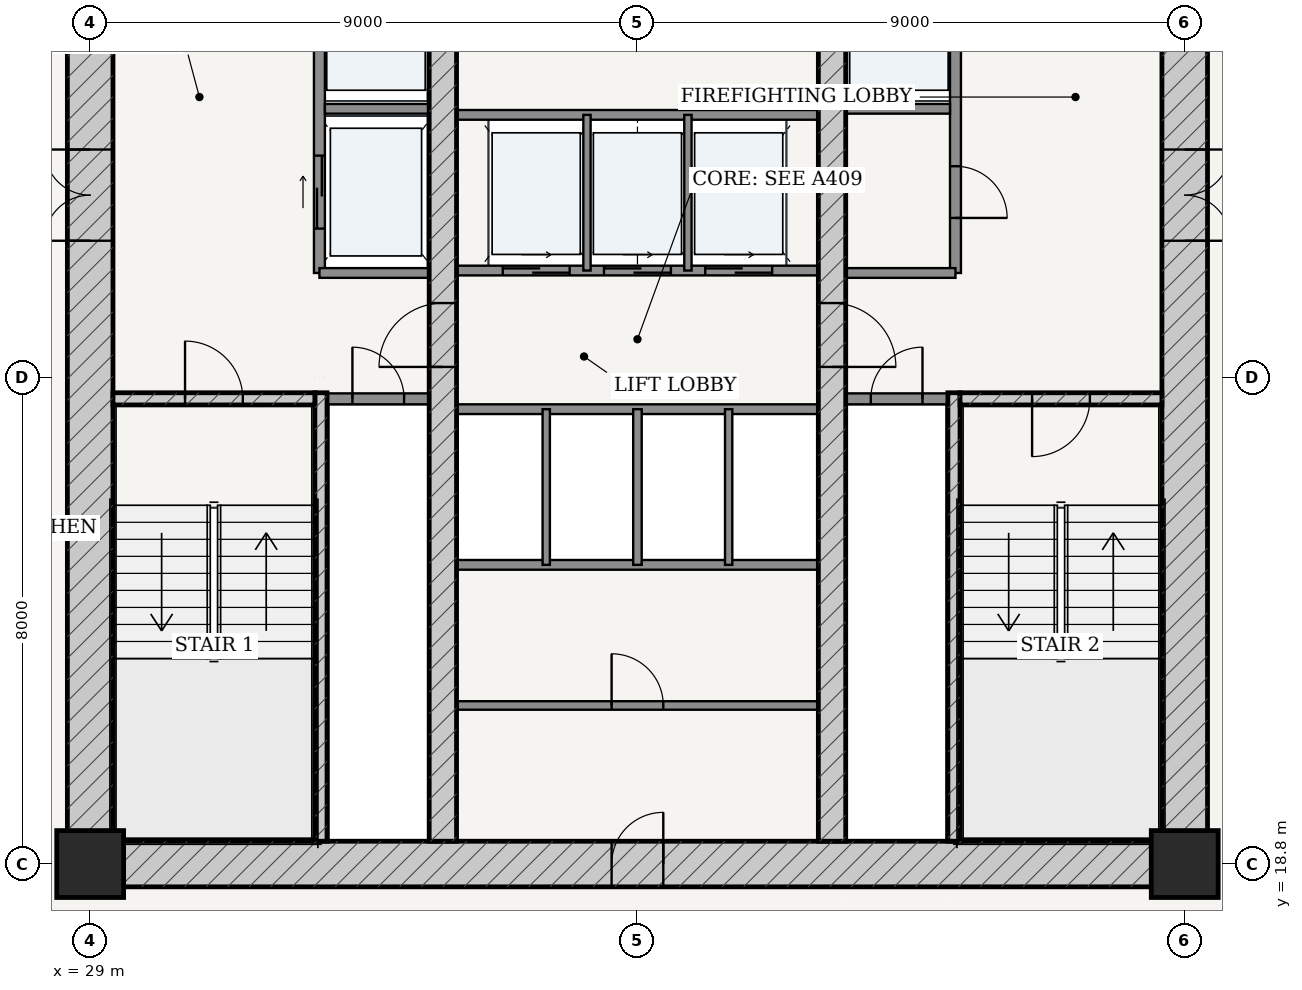
"""IFC4 building model, lengths in metres.
Left out: names, types, materials, properties, quantities, classifications, styles, units other than length and angle.
Written with IfcOpenShell. Run it as: python <this file> out.ifc"""

import sys

from ifc_helpers import new_model, si_unit, direction, frame, frame_2d, origin, origin_2d, place, context, subcontext, project, spatial, rectangle, extrude, source, transform, mapped, element, fill, save


model = new_model("IFC4")
c1 = context("Model", 3, precision=1e-05, world=origin(), true_north=direction((-0.2419218956, 0.970295726276)))
c2 = subcontext(c1, "Body", "Model", "MODEL_VIEW")
j1 = project(units=[si_unit("LENGTHUNIT", "METRE"), si_unit("PLANEANGLEUNIT", "RADIAN")], contexts=[c1])
p1 = place(None, origin())
s1 = spatial("IfcSite", under=j1, at=p1, CompositionType="ELEMENT")
p2 = place(p1, origin())
s2 = spatial("IfcBuilding", under=s1, at=p2, CompositionType="ELEMENT")
p3 = place(p2, frame((0.0, 0.0, 27.6)))
s3 = spatial("IfcBuildingStorey", under=s2, at=p3, CompositionType="ELEMENT", Elevation=27.6)
for number, where, z_axis, x_axis in (
    (1, (29.0, 18.8, 0.0), (0.0, 0.0, 1.0), (1.0, 0.0, 0.0)),
    (2, (47.0, 18.8, 0.0), (0.0, 0.0, 1.0), (1.0, 0.0, 0.0)),
):
    element("IfcColumn", number, at=place(p3, frame(where, z_axis=z_axis, x_axis=x_axis)), inside=s3, PredefinedType="COLUMN", context=c2, shape_type="SweptSolid", body=[
        extrude(rectangle(XDim=1.1, YDim=1.1, at=origin_2d()), origin(), (0.0, 0.0, 1.0), 3.6),
    ])
p4 = place(p3, frame((28.625, 18.8, 0.0), z_axis=(0.0, 0.0, 1.0), x_axis=(1.0, 0.0, 0.0)))
e3 = element("IfcWall", 3, at=p4, inside=s3, PredefinedType="SHEAR", context=c2, shape_type="SweptSolid", body=[
    extrude(rectangle(XDim=18.75, YDim=0.75, at=frame_2d((9.375, 0.0))), origin(), (0.0, 0.0, 1.0), 3.32),
])
p5 = place(p4, frame((8.95, 0.0, 0.0)))
e4 = element("IfcOpeningElement", 4, at=p5, cuts=e3, PredefinedType="OPENING", context=c2, shape_type="SweptSolid", body=[
    extrude(rectangle(XDim=0.85, YDim=2.1, at=frame_2d((0.425, 1.05))), frame((0.0, 0.385, 0.0), z_axis=(0.0, -1.0, 0.0), x_axis=(1.0, 0.0, 0.0)), (0.0, 0.0, 1.0), 0.77),
])
p6 = place(p3, frame((29.0, 19.175, 0.0), z_axis=(0.0, 0.0, 1.0), x_axis=(0.0, 1.0, 0.0)))
e5 = element("IfcWall", 5, at=p6, inside=s3, PredefinedType="SHEAR", context=c2, shape_type="SweptSolid", body=[
    extrude(rectangle(XDim=15.25, YDim=0.75, at=frame_2d((7.625, 0.0))), origin(), (0.0, 0.0, 1.0), 3.32),
])
p7 = place(p6, frame((9.875, 0.0, 0.0)))
e6 = element("IfcOpeningElement", 6, at=p7, cuts=e5, PredefinedType="OPENING", context=c2, shape_type="SweptSolid", body=[
    extrude(rectangle(XDim=1.5, YDim=2.2, at=frame_2d((0.75, 1.1))), frame((0.0, 0.385, 0.0), z_axis=(0.0, -1.0, 0.0), x_axis=(1.0, 0.0, 0.0)), (0.0, 0.0, 1.0), 0.77),
])
p8 = place(p3, frame((47.0, 19.175, 0.0), z_axis=(0.0, 0.0, 1.0), x_axis=(0.0, 1.0, 0.0)))
e7 = element("IfcWall", 7, at=p8, inside=s3, PredefinedType="SHEAR", context=c2, shape_type="SweptSolid", body=[
    extrude(rectangle(XDim=15.25, YDim=0.75, at=frame_2d((7.625, 0.0))), origin(), (0.0, 0.0, 1.0), 3.32),
])
p9 = place(p8, frame((9.875, 0.0, 0.0)))
e8 = element("IfcOpeningElement", 8, at=p9, cuts=e7, PredefinedType="OPENING", context=c2, shape_type="SweptSolid", body=[
    extrude(rectangle(XDim=1.5, YDim=2.2, at=frame_2d((0.75, 1.1))), frame((0.0, 0.385, 0.0), z_axis=(0.0, -1.0, 0.0), x_axis=(1.0, 0.0, 0.0)), (0.0, 0.0, 1.0), 0.77),
])
p10 = place(p3, frame((32.795, 19.175, 0.0), z_axis=(0.0, 0.0, 1.0), x_axis=(0.0, 1.0, 0.0)))
e9 = element("IfcWall", 9, at=p10, inside=s3, PredefinedType="SOLIDWALL", context=c2, shape_type="SweptSolid", body=[
    extrude(rectangle(XDim=7.375, YDim=0.2, at=frame_2d((3.688, 0.0))), origin(), (0.0, 0.0, 1.0), 3.32),
])
p11 = place(p3, frame((29.375, 26.45, 0.0), z_axis=(0.0, 0.0, 1.0), x_axis=(1.0, 0.0, 0.0)))
e10 = element("IfcWall", 10, at=p11, inside=s3, PredefinedType="SOLIDWALL", context=c2, shape_type="SweptSolid", body=[
    extrude(rectangle(XDim=3.32, YDim=0.2, at=frame_2d((1.66, 0.0))), origin(), (0.0, 0.0, 1.0), 3.32),
])
p12 = place(p11, frame((1.185, 0.0, 0.0)))
e11 = element("IfcOpeningElement", 11, at=p12, cuts=e10, PredefinedType="OPENING", context=c2, shape_type="SweptSolid", body=[
    extrude(rectangle(XDim=0.95, YDim=2.15, at=frame_2d((0.475, 1.075))), frame((0.0, 0.11, 0.0), z_axis=(0.0, -1.0, 0.0), x_axis=(1.0, 0.0, 0.0)), (0.0, 0.0, 1.0), 0.22),
])
p13 = place(p3, frame((43.205, 19.175, 0.0), z_axis=(0.0, 0.0, 1.0), x_axis=(0.0, 1.0, 0.0)))
e12 = element("IfcWall", 12, at=p13, inside=s3, PredefinedType="SOLIDWALL", context=c2, shape_type="SweptSolid", body=[
    extrude(rectangle(XDim=7.375, YDim=0.2, at=frame_2d((3.688, 0.0))), origin(), (0.0, 0.0, 1.0), 3.32),
])
p14 = place(p3, frame((43.305, 26.45, 0.0), z_axis=(0.0, 0.0, 1.0), x_axis=(1.0, 0.0, 0.0)))
e13 = element("IfcWall", 13, at=p14, inside=s3, PredefinedType="SOLIDWALL", context=c2, shape_type="SweptSolid", body=[
    extrude(rectangle(XDim=3.32, YDim=0.2, at=frame_2d((1.66, 0.0))), origin(), (0.0, 0.0, 1.0), 3.32),
])
p15 = place(p14, frame((1.185, 0.0, 0.0)))
e14 = element("IfcOpeningElement", 14, at=p15, cuts=e13, PredefinedType="OPENING", context=c2, shape_type="SweptSolid", body=[
    extrude(rectangle(XDim=0.95, YDim=2.15, at=frame_2d((0.475, 1.075))), frame((0.0, 0.11, 0.0), z_axis=(0.0, -1.0, 0.0), x_axis=(1.0, 0.0, 0.0)), (0.0, 0.0, 1.0), 0.22),
])
p16 = place(p3, frame((34.8, 19.175, 0.0), z_axis=(0.0, 0.0, 1.0), x_axis=(0.0, 1.0, 0.0)))
e15 = element("IfcWall", 15, at=p16, inside=s3, PredefinedType="SHEAR", context=c2, shape_type="SweptSolid", body=[
    extrude(rectangle(XDim=15.25, YDim=0.45, at=frame_2d((7.625, 0.0))), origin(), (0.0, 0.0, 1.0), 3.32),
])
p17 = place(p16, frame((7.8, 0.0, 0.0)))
e16 = element("IfcOpeningElement", 16, at=p17, cuts=e15, PredefinedType="OPENING", context=c2, shape_type="SweptSolid", body=[
    extrude(rectangle(XDim=1.05, YDim=2.15, at=frame_2d((0.525, 1.075))), frame((0.0, 0.235, 0.0), z_axis=(0.0, -1.0, 0.0), x_axis=(1.0, 0.0, 0.0)), (0.0, 0.0, 1.0), 0.47),
])
p18 = place(p3, frame((41.2, 19.175, 0.0), z_axis=(0.0, 0.0, 1.0), x_axis=(0.0, 1.0, 0.0)))
e17 = element("IfcWall", 17, at=p18, inside=s3, PredefinedType="SHEAR", context=c2, shape_type="SweptSolid", body=[
    extrude(rectangle(XDim=15.25, YDim=0.45, at=frame_2d((7.625, 0.0))), origin(), (0.0, 0.0, 1.0), 3.32),
])
p19 = place(p18, frame((7.8, 0.0, 0.0)))
e18 = element("IfcOpeningElement", 18, at=p19, cuts=e17, PredefinedType="OPENING", context=c2, shape_type="SweptSolid", body=[
    extrude(rectangle(XDim=1.05, YDim=2.15, at=frame_2d((0.525, 1.075))), frame((0.0, 0.235, 0.0), z_axis=(0.0, -1.0, 0.0), x_axis=(1.0, 0.0, 0.0)), (0.0, 0.0, 1.0), 0.47),
])
p20 = place(p3, frame((32.9, 26.45, 0.0), z_axis=(0.0, 0.0, 1.0), x_axis=(1.0, 0.0, 0.0)))
e19 = element("IfcWall", 19, at=p20, inside=s3, PredefinedType="PARTITIONING", context=c2, shape_type="SweptSolid", body=[
    extrude(rectangle(XDim=1.675, YDim=0.18, at=frame_2d((0.837, 0.0))), origin(), (0.0, 0.0, 1.0), 3.32),
])
p21 = place(p20, frame((0.413, 0.0, 0.0)))
e20 = element("IfcOpeningElement", 20, at=p21, cuts=e19, PredefinedType="OPENING", context=c2, shape_type="SweptSolid", body=[
    extrude(rectangle(XDim=0.85, YDim=2.1, at=frame_2d((0.425, 1.05))), frame((0.0, 0.1, 0.0), z_axis=(0.0, -1.0, 0.0), x_axis=(1.0, 0.0, 0.0)), (0.0, 0.0, 1.0), 0.2),
])
p22 = place(p3, frame((41.425, 26.45, 0.0), z_axis=(0.0, 0.0, 1.0), x_axis=(1.0, 0.0, 0.0)))
e21 = element("IfcWall", 21, at=p22, inside=s3, PredefinedType="PARTITIONING", context=c2, shape_type="SweptSolid", body=[
    extrude(rectangle(XDim=1.675, YDim=0.18, at=frame_2d((0.837, 0.0))), origin(), (0.0, 0.0, 1.0), 3.32),
])
p23 = place(p22, frame((0.413, 0.0, 0.0)))
e22 = element("IfcOpeningElement", 22, at=p23, cuts=e21, PredefinedType="OPENING", context=c2, shape_type="SweptSolid", body=[
    extrude(rectangle(XDim=0.85, YDim=2.1, at=frame_2d((0.425, 1.05))), frame((0.0, 0.1, 0.0), z_axis=(0.0, -1.0, 0.0), x_axis=(1.0, 0.0, 0.0)), (0.0, 0.0, 1.0), 0.2),
])
p24 = place(p3, frame((32.77, 28.52, 0.0), z_axis=(0.0, 0.0, 1.0), x_axis=(0.0, 1.0, 0.0)))
e23 = element("IfcWall", 23, at=p24, inside=s3, PredefinedType="PARTITIONING", context=c2, shape_type="SweptSolid", body=[
    extrude(rectangle(XDim=5.905, YDim=0.18, at=frame_2d((2.953, 0.0))), origin(), (0.0, 0.0, 1.0), 3.32),
])
p25 = place(p24, frame((3.655, 0.0, 0.0)))
e24 = element("IfcOpeningElement", 24, at=p25, cuts=e23, PredefinedType="OPENING", context=c2, shape_type="SweptSolid", body=[
    extrude(rectangle(XDim=1.15, YDim=2.2, at=frame_2d((0.575, 1.1))), frame((0.0, 0.1, 0.0), z_axis=(0.0, -1.0, 0.0), x_axis=(1.0, 0.0, 0.0)), (0.0, 0.0, 1.0), 0.2),
])
p26 = place(p24, frame((0.73, 0.0, 0.0)))
e25 = element("IfcOpeningElement", 25, at=p26, cuts=e23, PredefinedType="OPENING", context=c2, shape_type="SweptSolid", body=[
    extrude(rectangle(XDim=1.2, YDim=2.25, at=frame_2d((0.6, 1.125))), frame((0.0, 0.1, 0.0), z_axis=(0.0, -1.0, 0.0), x_axis=(1.0, 0.0, 0.0)), (0.0, 0.0, 1.0), 0.2),
])
p27 = place(p3, frame((32.86, 31.22, 0.0), z_axis=(0.0, 0.0, 1.0), x_axis=(1.0, 0.0, 0.0)))
e26 = element("IfcWall", 26, at=p27, inside=s3, PredefinedType="PARTITIONING", context=c2, shape_type="SweptSolid", body=[
    extrude(rectangle(XDim=1.715, YDim=0.16, at=frame_2d((0.857, 0.0))), origin(), (0.0, 0.0, 1.0), 3.32),
])
p28 = place(p3, frame((32.77, 28.52, 0.0), z_axis=(0.0, 0.0, 1.0), x_axis=(1.0, 0.0, 0.0)))
e27 = element("IfcWall", 27, at=p28, inside=s3, PredefinedType="PARTITIONING", context=c2, shape_type="SweptSolid", body=[
    extrude(rectangle(XDim=1.805, YDim=0.16, at=frame_2d((0.902, 0.0))), origin(), (0.0, 0.0, 1.0), 3.32),
])
p29 = place(p3, frame((43.23, 28.52, 0.0), z_axis=(0.0, 0.0, 1.0), x_axis=(0.0, 1.0, 0.0)))
e28 = element("IfcWall", 28, at=p29, inside=s3, PredefinedType="PARTITIONING", context=c2, shape_type="SweptSolid", body=[
    extrude(rectangle(XDim=5.905, YDim=0.18, at=frame_2d((2.953, 0.0))), origin(), (0.0, 0.0, 1.0), 3.32),
])
p30 = place(p29, frame((0.905, 0.0, 0.0)))
e29 = element("IfcOpeningElement", 29, at=p30, cuts=e28, PredefinedType="OPENING", context=c2, shape_type="SweptSolid", body=[
    extrude(rectangle(XDim=0.85, YDim=2.1, at=frame_2d((0.425, 1.05))), frame((0.0, 0.1, 0.0), z_axis=(0.0, -1.0, 0.0), x_axis=(1.0, 0.0, 0.0)), (0.0, 0.0, 1.0), 0.2),
])
p31 = place(p29, frame((3.655, 0.0, 0.0)))
e30 = element("IfcOpeningElement", 30, at=p31, cuts=e28, PredefinedType="OPENING", context=c2, shape_type="SweptSolid", body=[
    extrude(rectangle(XDim=1.15, YDim=2.2, at=frame_2d((0.575, 1.1))), frame((0.0, 0.1, 0.0), z_axis=(0.0, -1.0, 0.0), x_axis=(1.0, 0.0, 0.0)), (0.0, 0.0, 1.0), 0.2),
])
p32 = place(p3, frame((41.425, 31.22, 0.0), z_axis=(0.0, 0.0, 1.0), x_axis=(1.0, 0.0, 0.0)))
e31 = element("IfcWall", 31, at=p32, inside=s3, PredefinedType="PARTITIONING", context=c2, shape_type="SweptSolid", body=[
    extrude(rectangle(XDim=1.715, YDim=0.16, at=frame_2d((0.857, 0.0))), origin(), (0.0, 0.0, 1.0), 3.32),
])
p33 = place(p3, frame((41.425, 28.52, 0.0), z_axis=(0.0, 0.0, 1.0), x_axis=(1.0, 0.0, 0.0)))
e32 = element("IfcWall", 32, at=p33, inside=s3, PredefinedType="PARTITIONING", context=c2, shape_type="SweptSolid", body=[
    extrude(rectangle(XDim=1.805, YDim=0.16, at=frame_2d((0.902, 0.0))), origin(), (0.0, 0.0, 1.0), 3.32),
])
p34 = place(p3, frame((35.025, 28.56, 0.0), z_axis=(0.0, 0.0, 1.0), x_axis=(1.0, 0.0, 0.0)))
e33 = element("IfcWall", 33, at=p34, inside=s3, PredefinedType="PARTITIONING", context=c2, shape_type="SweptSolid", body=[
    extrude(rectangle(XDim=5.95, YDim=0.16, at=frame_2d((2.975, 0.0))), origin(), (0.0, 0.0, 1.0), 3.32),
])
p35 = place(p34, frame((0.76, 0.0, 0.0)))
e34 = element("IfcOpeningElement", 34, at=p35, cuts=e33, PredefinedType="OPENING", context=c2, shape_type="SweptSolid", body=[
    extrude(rectangle(XDim=1.1, YDim=2.2, at=frame_2d((0.55, 1.1))), frame((0.0, 0.09, 0.0), z_axis=(0.0, -1.0, 0.0), x_axis=(1.0, 0.0, 0.0)), (0.0, 0.0, 1.0), 0.18),
])
p36 = place(p34, frame((2.425, 0.0, 0.0)))
e35 = element("IfcOpeningElement", 35, at=p36, cuts=e33, PredefinedType="OPENING", context=c2, shape_type="SweptSolid", body=[
    extrude(rectangle(XDim=1.1, YDim=2.2, at=frame_2d((0.55, 1.1))), frame((0.0, 0.09, 0.0), z_axis=(0.0, -1.0, 0.0), x_axis=(1.0, 0.0, 0.0)), (0.0, 0.0, 1.0), 0.18),
])
p37 = place(p34, frame((4.09, 0.0, 0.0)))
e36 = element("IfcOpeningElement", 36, at=p37, cuts=e33, PredefinedType="OPENING", context=c2, shape_type="SweptSolid", body=[
    extrude(rectangle(XDim=1.1, YDim=2.2, at=frame_2d((0.55, 1.1))), frame((0.0, 0.09, 0.0), z_axis=(0.0, -1.0, 0.0), x_axis=(1.0, 0.0, 0.0)), (0.0, 0.0, 1.0), 0.18),
])
p38 = place(p3, frame((35.025, 31.12, 0.0), z_axis=(0.0, 0.0, 1.0), x_axis=(1.0, 0.0, 0.0)))
e37 = element("IfcWall", 37, at=p38, inside=s3, PredefinedType="PARTITIONING", context=c2, shape_type="SweptSolid", body=[
    extrude(rectangle(XDim=5.95, YDim=0.16, at=frame_2d((2.975, 0.0))), origin(), (0.0, 0.0, 1.0), 3.32),
])
for number, where, z_axis, x_axis in (
    (38, (37.17, 28.56, 0.0), (0.0, 0.0, 1.0), (0.0, 1.0, 0.0)),
    (39, (38.83, 28.56, 0.0), (0.0, 0.0, 1.0), (0.0, 1.0, 0.0)),
):
    element("IfcWall", number, at=place(p3, frame(where, z_axis=z_axis, x_axis=x_axis)), inside=s3, PredefinedType="PARTITIONING", context=c2, shape_type="SweptSolid", body=[
        extrude(rectangle(XDim=2.56, YDim=0.12, at=frame_2d((1.28, 0.0))), origin(), (0.0, 0.0, 1.0), 3.32),
    ])
for number, where, z_axis, x_axis in (
    (40, (35.025, 26.28, 0.0), (0.0, 0.0, 1.0), (1.0, 0.0, 0.0)),
    (41, (35.025, 23.72, 0.0), (0.0, 0.0, 1.0), (1.0, 0.0, 0.0)),
):
    element("IfcWall", number, at=place(p3, frame(where, z_axis=z_axis, x_axis=x_axis)), inside=s3, PredefinedType="PARTITIONING", context=c2, shape_type="SweptSolid", body=[
        extrude(rectangle(XDim=5.95, YDim=0.16, at=frame_2d((2.975, 0.0))), origin(), (0.0, 0.0, 1.0), 3.32),
    ])
p39 = place(p3, frame((36.5, 23.72, 0.0), z_axis=(0.0, 0.0, 1.0), x_axis=(0.0, 1.0, 0.0)))
e42 = element("IfcWall", 42, at=p39, inside=s3, PredefinedType="PARTITIONING", context=c2, shape_type="SweptSolid", body=[
    extrude(rectangle(XDim=2.56, YDim=0.12, at=frame_2d((1.28, 0.0))), origin(), (0.0, 0.0, 1.0), 3.32),
])
p40 = place(p3, frame((38.0, 23.72, 0.0), z_axis=(0.0, 0.0, 1.0), x_axis=(0.0, 1.0, 0.0)))
e43 = element("IfcWall", 43, at=p40, inside=s3, PredefinedType="PARTITIONING", context=c2, shape_type="SweptSolid", body=[
    extrude(rectangle(XDim=2.56, YDim=0.14, at=frame_2d((1.28, 0.0))), origin(), (0.0, 0.0, 1.0), 3.32),
])
p41 = place(p3, frame((39.5, 23.72, 0.0), z_axis=(0.0, 0.0, 1.0), x_axis=(0.0, 1.0, 0.0)))
e44 = element("IfcWall", 44, at=p41, inside=s3, PredefinedType="PARTITIONING", context=c2, shape_type="SweptSolid", body=[
    extrude(rectangle(XDim=2.56, YDim=0.12, at=frame_2d((1.28, 0.0))), origin(), (0.0, 0.0, 1.0), 3.32),
])
p42 = place(p3, frame((35.025, 21.407, 0.0), z_axis=(0.0, 0.0, 1.0), x_axis=(1.0, 0.0, 0.0)))
e45 = element("IfcWall", 45, at=p42, inside=s3, PredefinedType="PARTITIONING", context=c2, shape_type="SweptSolid", body=[
    extrude(rectangle(XDim=5.95, YDim=0.14, at=frame_2d((2.975, 0.0))), origin(), (0.0, 0.0, 1.0), 3.32),
])
p43 = place(p42, frame((2.55, 0.0, 0.0)))
e46 = element("IfcOpeningElement", 46, at=p43, cuts=e45, PredefinedType="OPENING", context=c2, shape_type="SweptSolid", body=[
    extrude(rectangle(XDim=0.85, YDim=2.1, at=frame_2d((0.425, 1.05))), frame((0.0, 0.08, 0.0), z_axis=(0.0, -1.0, 0.0), x_axis=(1.0, 0.0, 0.0)), (0.0, 0.0, 1.0), 0.16),
])
m1 = source(origin(), c2, "Body", "SweptSolid", [
    extrude(rectangle(XDim=1.5, YDim=2.2, at=frame_2d((0.75, 1.1))), frame((0.0, 0.025, 0.0), z_axis=(0.0, -1.0, 0.0), x_axis=(1.0, 0.0, 0.0)), (0.0, 0.0, 1.0), 0.05),
])
p44 = place(p7, origin())
e47 = element("IfcDoor", 47, at=p44, inside=s3, OperationType="DOUBLE_DOOR_SINGLE_SWING", PredefinedType="DOOR", context=c2, shape_type="MappedRepresentation", body=[
    mapped(m1, transform((0.0, 0.0, 0.0), scale=1.0)),
])
fill(e6, e47)
p45 = place(p9, frame((1.5, 0.0, 0.0), z_axis=(0.0, 0.0, 1.0), x_axis=(-1.0, 0.0, 0.0)))
e48 = element("IfcDoor", 48, at=p45, inside=s3, OperationType="DOUBLE_DOOR_SINGLE_SWING", PredefinedType="DOOR", context=c2, shape_type="MappedRepresentation", body=[
    mapped(m1, transform((0.0, 0.0, 0.0), scale=1.0)),
])
fill(e8, e48)
m2 = source(origin(), c2, "Body", "SweptSolid", [
    extrude(rectangle(XDim=1.05, YDim=2.15, at=frame_2d((0.525, 1.075))), frame((0.0, 0.025, 0.0), z_axis=(0.0, -1.0, 0.0), x_axis=(1.0, 0.0, 0.0)), (0.0, 0.0, 1.0), 0.05),
])
p46 = place(p17, origin())
e49 = element("IfcDoor", 49, at=p46, inside=s3, OperationType="SINGLE_SWING_LEFT", PredefinedType="DOOR", context=c2, shape_type="MappedRepresentation", body=[
    mapped(m2, transform((0.0, 0.0, 0.0), scale=1.0)),
])
fill(e16, e49)
p47 = place(p19, frame((1.05, 0.0, 0.0), z_axis=(0.0, 0.0, 1.0), x_axis=(-1.0, 0.0, 0.0)))
e50 = element("IfcDoor", 50, at=p47, inside=s3, OperationType="SINGLE_SWING_RIGHT", PredefinedType="DOOR", context=c2, shape_type="MappedRepresentation", body=[
    mapped(m2, transform((0.0, 0.0, 0.0), scale=1.0)),
])
fill(e18, e50)
m3 = source(origin(), c2, "Body", "SweptSolid", [
    extrude(rectangle(XDim=0.95, YDim=2.15, at=frame_2d((0.475, 1.075))), frame((0.0, 0.025, 0.0), z_axis=(0.0, -1.0, 0.0), x_axis=(1.0, 0.0, 0.0)), (0.0, 0.0, 1.0), 0.05),
])
p48 = place(p12, origin())
e51 = element("IfcDoor", 51, at=p48, inside=s3, OperationType="SINGLE_SWING_LEFT", PredefinedType="DOOR", context=c2, shape_type="MappedRepresentation", body=[
    mapped(m3, transform((0.0, 0.0, 0.0), scale=1.0)),
])
fill(e11, e51)
p49 = place(p15, frame((0.95, 0.0, 0.0), z_axis=(0.0, 0.0, 1.0), x_axis=(-1.0, 0.0, 0.0)))
e52 = element("IfcDoor", 52, at=p49, inside=s3, OperationType="SINGLE_SWING_RIGHT", PredefinedType="DOOR", context=c2, shape_type="MappedRepresentation", body=[
    mapped(m3, transform((0.0, 0.0, 0.0), scale=1.0)),
])
fill(e14, e52)
m4 = source(origin(), c2, "Body", "SweptSolid", [
    extrude(rectangle(XDim=0.85, YDim=2.1, at=frame_2d((0.425, 1.05))), frame((0.0, 0.025, 0.0), z_axis=(0.0, -1.0, 0.0), x_axis=(1.0, 0.0, 0.0)), (0.0, 0.0, 1.0), 0.05),
])
p50 = place(p21, origin())
e53 = element("IfcDoor", 53, at=p50, inside=s3, OperationType="SINGLE_SWING_LEFT", PredefinedType="DOOR", context=c2, shape_type="MappedRepresentation", body=[
    mapped(m4, transform((0.0, 0.0, 0.0), scale=1.0)),
])
fill(e20, e53)
p51 = place(p23, origin())
e54 = element("IfcDoor", 54, at=p51, inside=s3, OperationType="SINGLE_SWING_RIGHT", PredefinedType="DOOR", context=c2, shape_type="MappedRepresentation", body=[
    mapped(m4, transform((0.0, 0.0, 0.0), scale=1.0)),
])
fill(e22, e54)
p52 = place(p30, frame((0.85, 0.0, 0.0), z_axis=(0.0, 0.0, 1.0), x_axis=(-1.0, 0.0, 0.0)))
e55 = element("IfcDoor", 55, at=p52, inside=s3, OperationType="SINGLE_SWING_RIGHT", PredefinedType="DOOR", context=c2, shape_type="MappedRepresentation", body=[
    mapped(m4, transform((0.0, 0.0, 0.0), scale=1.0)),
])
fill(e29, e55)
p53 = place(p5, origin())
e56 = element("IfcDoor", 56, at=p53, inside=s3, OperationType="SINGLE_SWING_RIGHT", PredefinedType="DOOR", context=c2, shape_type="MappedRepresentation", body=[
    mapped(m4, transform((0.0, 0.0, 0.0), scale=1.0)),
])
fill(e4, e56)
p54 = place(p43, origin())
e57 = element("IfcDoor", 57, at=p54, inside=s3, OperationType="SINGLE_SWING_LEFT", PredefinedType="DOOR", context=c2, shape_type="MappedRepresentation", body=[
    mapped(m4, transform((0.0, 0.0, 0.0), scale=1.0)),
])
fill(e46, e57)
m5 = source(origin(), c2, "Body", "SweptSolid", [
    extrude(rectangle(XDim=1.2, YDim=2.25, at=frame_2d((0.6, 1.125))), frame((0.0, 0.025, 0.0), z_axis=(0.0, -1.0, 0.0), x_axis=(1.0, 0.0, 0.0)), (0.0, 0.0, 1.0), 0.05),
])
p55 = place(p26, origin())
e58 = element("IfcDoor", 58, at=p55, inside=s3, OperationType="DOUBLE_DOOR_SLIDING", PredefinedType="DOOR", context=c2, shape_type="MappedRepresentation", body=[
    mapped(m5, transform((0.0, 0.0, 0.0), scale=1.0)),
])
fill(e25, e58)
m6 = source(origin(), c2, "Body", "SweptSolid", [
    extrude(rectangle(XDim=1.1, YDim=2.2, at=frame_2d((0.55, 1.1))), frame((0.0, 0.025, 0.0), z_axis=(0.0, -1.0, 0.0), x_axis=(1.0, 0.0, 0.0)), (0.0, 0.0, 1.0), 0.05),
])
p56 = place(p35, origin())
e59 = element("IfcDoor", 59, at=p56, inside=s3, OperationType="DOUBLE_DOOR_SLIDING", PredefinedType="DOOR", context=c2, shape_type="MappedRepresentation", body=[
    mapped(m6, transform((0.0, 0.0, 0.0), scale=1.0)),
])
fill(e34, e59)
p57 = place(p36, origin())
e60 = element("IfcDoor", 60, at=p57, inside=s3, OperationType="DOUBLE_DOOR_SLIDING", PredefinedType="DOOR", context=c2, shape_type="MappedRepresentation", body=[
    mapped(m6, transform((0.0, 0.0, 0.0), scale=1.0)),
])
fill(e35, e60)
p58 = place(p37, origin())
e61 = element("IfcDoor", 61, at=p58, inside=s3, OperationType="DOUBLE_DOOR_SLIDING", PredefinedType="DOOR", context=c2, shape_type="MappedRepresentation", body=[
    mapped(m6, transform((0.0, 0.0, 0.0), scale=1.0)),
])
fill(e36, e61)
save(model, sys.argv[1])
